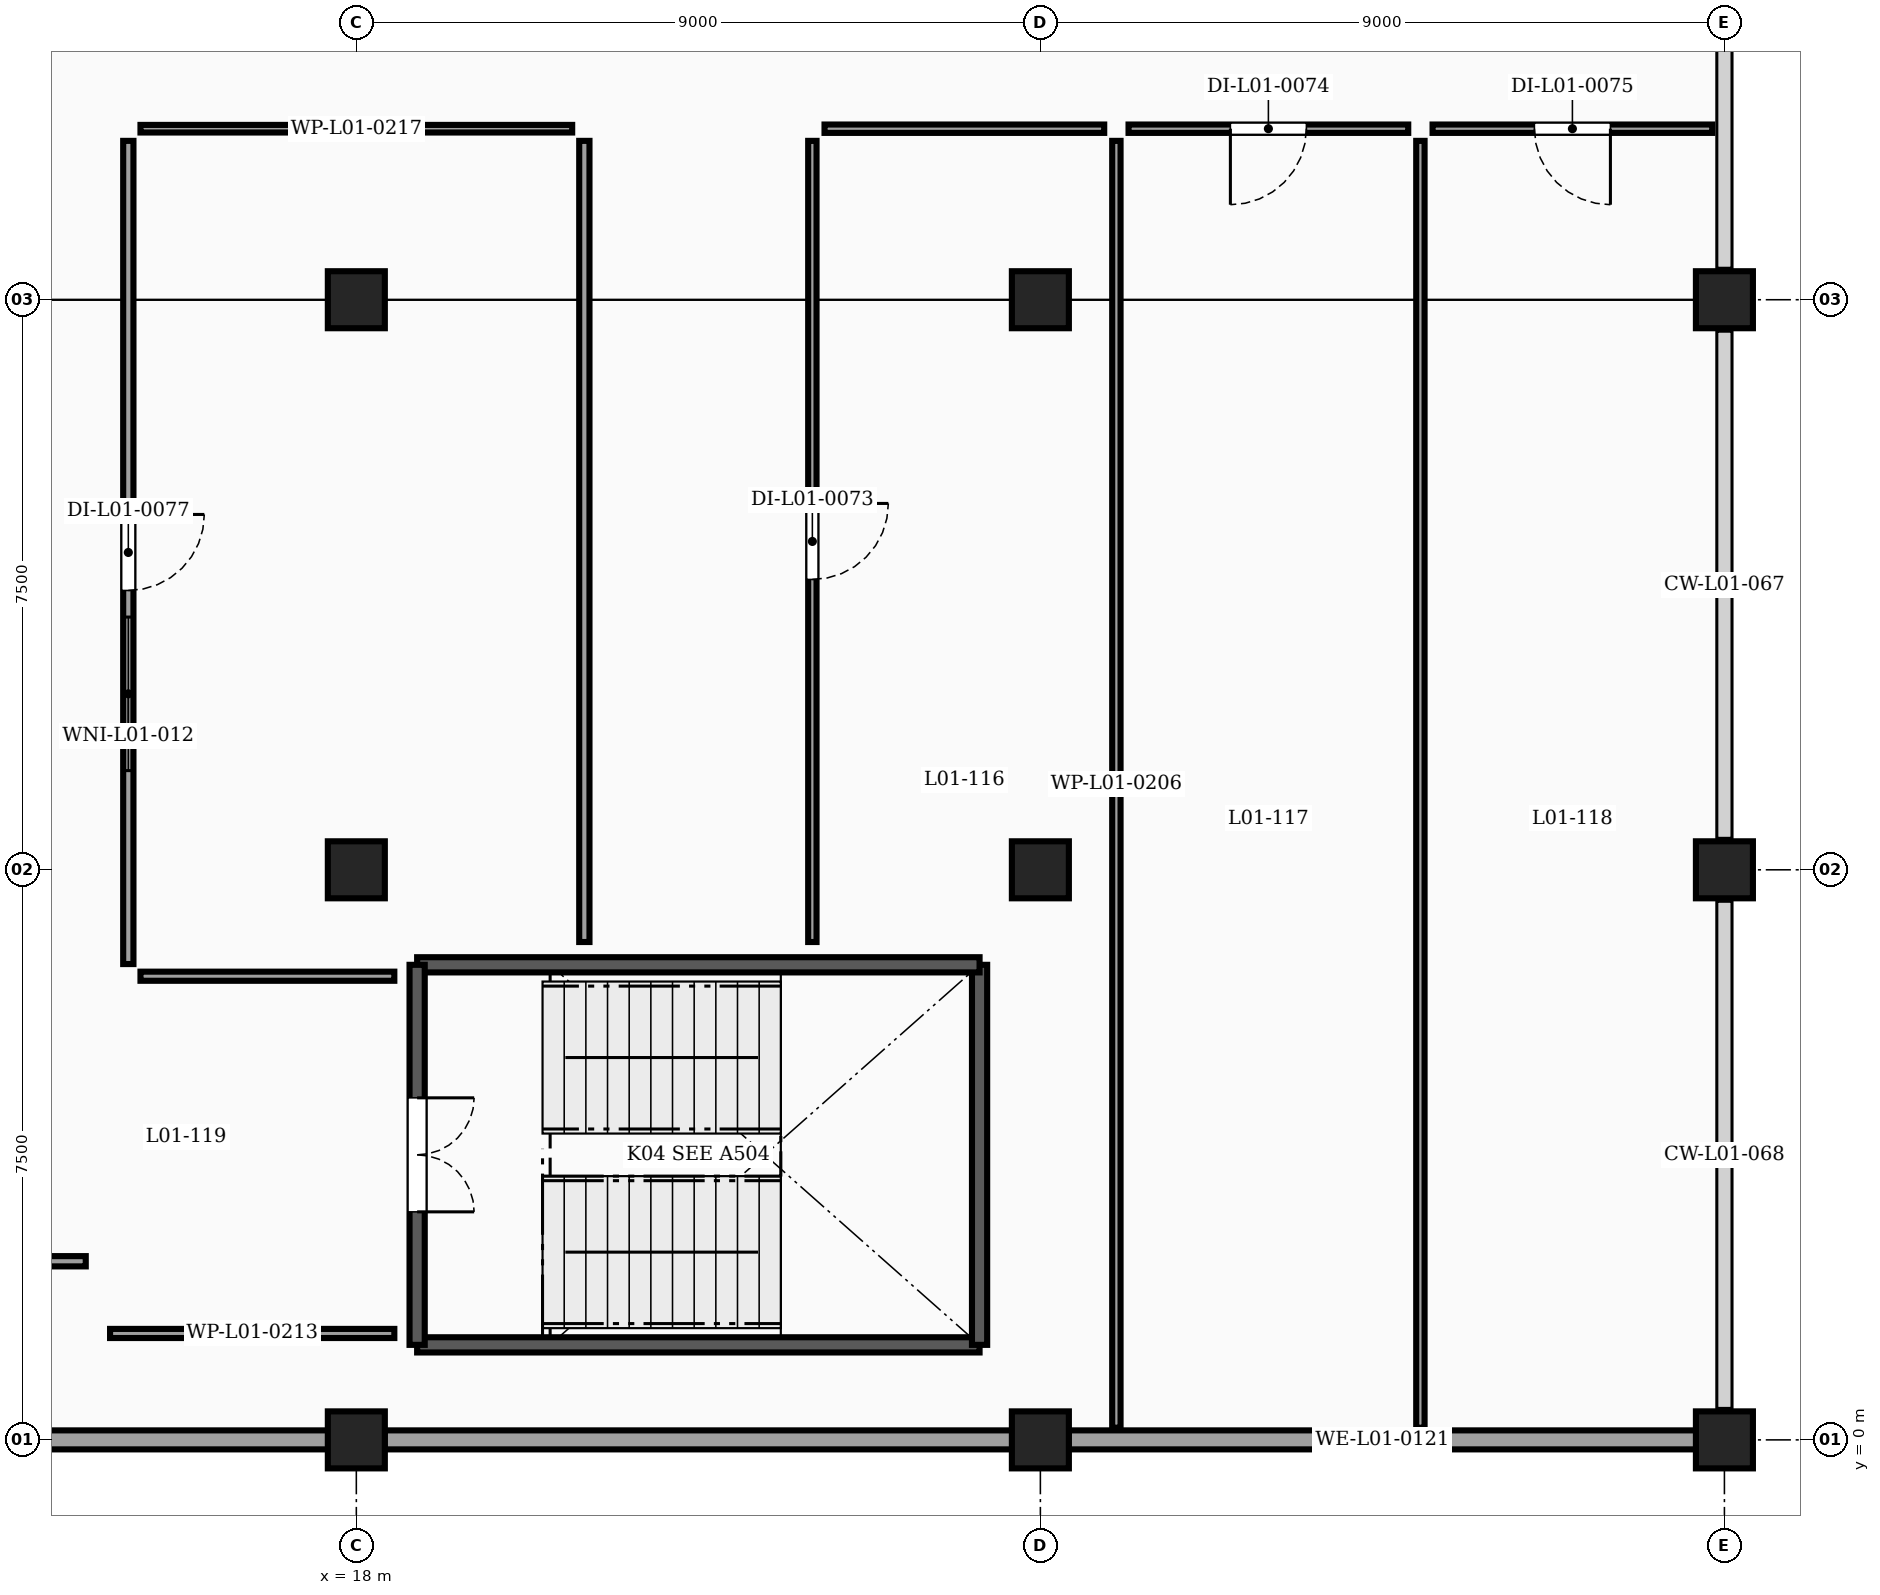
"""IFC4 building model, lengths in metres.
Left out: names, types, materials, properties, quantities, classifications, styles, units other than length and angle.
Written with IfcOpenShell. Run it as: python <this file> out.ifc"""

import sys

from ifc_helpers import new_model, si_unit, direction, frame, frame_2d, origin, origin_2d, place, context, subcontext, project, spatial, rectangle, extrude, element, fill, save


model = new_model("IFC4")
c1 = context("Model", 3, precision=1e-05, world=origin(), true_north=direction((0.0, 1.0)))
c2 = subcontext(c1, "Body", "Model", "MODEL_VIEW")
j1 = project(units=[si_unit("LENGTHUNIT", "METRE"), si_unit("PLANEANGLEUNIT", "RADIAN")], contexts=[c1])
p1 = place(None, origin())
s1 = spatial("IfcSite", under=j1, at=p1, CompositionType="ELEMENT")
p2 = place(p1, origin())
s2 = spatial("IfcBuilding", under=s1, at=p2, CompositionType="ELEMENT")
p3 = place(p2, frame((0.0, 0.0, 4.5)))
s3 = spatial("IfcBuildingStorey", under=s2, at=p3, CompositionType="ELEMENT", Elevation=4.5)
for number, where, z_axis, x_axis in (
    (1, (18.0, 0.0, 0.0), (0.0, 0.0, 1.0), (1.0, 0.0, 0.0)),
    (2, (27.0, 0.0, 0.0), (0.0, 0.0, 1.0), (1.0, 0.0, 0.0)),
    (3, (36.0, 0.0, 0.0), (0.0, 0.0, 1.0), (1.0, 0.0, 0.0)),
    (4, (18.0, 7.5, 0.0), (0.0, 0.0, 1.0), (1.0, 0.0, 0.0)),
    (5, (27.0, 7.5, 0.0), (0.0, 0.0, 1.0), (1.0, 0.0, 0.0)),
    (6, (36.0, 7.5, 0.0), (0.0, 0.0, 1.0), (1.0, 0.0, 0.0)),
    (7, (18.0, 15.0, 0.0), (0.0, 0.0, 1.0), (1.0, 0.0, 0.0)),
    (8, (27.0, 15.0, 0.0), (0.0, 0.0, 1.0), (1.0, 0.0, 0.0)),
    (9, (36.0, 15.0, 0.0), (0.0, 0.0, 1.0), (1.0, 0.0, 0.0)),
):
    element("IfcColumn", number, at=place(p3, frame(where, z_axis=z_axis, x_axis=x_axis)), inside=s3, PredefinedType="COLUMN", context=c2, shape_type="SweptSolid", body=[
        extrude(rectangle(XDim=0.75, YDim=0.75, at=origin_2d()), origin(), (0.0, 0.0, 1.0), 4.0),
    ])
for number, where, z_axis, x_axis in (
    (10, (35.629, 0.0, 0.0), (0.0, 0.0, 1.0), (-1.0, 0.0, 0.0)),
    (11, (26.629, 0.0, 0.0), (0.0, 0.0, 1.0), (-1.0, 0.0, 0.0)),
    (12, (17.629, 0.0, 0.0), (0.0, 0.0, 1.0), (-1.0, 0.0, 0.0)),
):
    element("IfcWall", number, at=place(p3, frame(where, z_axis=z_axis, x_axis=x_axis)), inside=s3, PredefinedType="SOLIDWALL", context=c2, shape_type="SweptSolid", body=[
        extrude(rectangle(XDim=8.258, YDim=0.25, at=frame_2d((4.129, 0.0))), origin(), (0.0, 0.0, 1.0), 3.41),
    ])
p4 = place(p3, frame((18.8, 1.25, 0.0), z_axis=(0.0, 0.0, 1.0), x_axis=(1.0, 0.0, 0.0)))
e13 = element("IfcWall", 13, at=p4, inside=s3, PredefinedType="SHEAR", context=c2, shape_type="SweptSolid", body=[
    extrude(rectangle(XDim=7.4, YDim=0.2, at=frame_2d((3.7, 0.0))), origin(), (0.0, 0.0, 1.0), 3.77),
])
p5 = place(p3, frame((26.2, 1.25, 0.0), z_axis=(0.0, 0.0, 1.0), x_axis=(0.0, 1.0, 0.0)))
e14 = element("IfcWall", 14, at=p5, inside=s3, PredefinedType="SHEAR", context=c2, shape_type="SweptSolid", body=[
    extrude(rectangle(XDim=5.0, YDim=0.2, at=frame_2d((2.5, 0.0))), origin(), (0.0, 0.0, 1.0), 3.77),
])
p6 = place(p3, frame((26.2, 6.25, 0.0), z_axis=(0.0, 0.0, 1.0), x_axis=(-1.0, 0.0, 0.0)))
e15 = element("IfcWall", 15, at=p6, inside=s3, PredefinedType="SHEAR", context=c2, shape_type="SweptSolid", body=[
    extrude(rectangle(XDim=7.4, YDim=0.2, at=frame_2d((3.7, 0.0))), origin(), (0.0, 0.0, 1.0), 3.77),
])
p7 = place(p3, frame((18.8, 6.25, 0.0), z_axis=(0.0, 0.0, 1.0), x_axis=(0.0, -1.0, 0.0)))
e16 = element("IfcWall", 16, at=p7, inside=s3, PredefinedType="SHEAR", context=c2, shape_type="SweptSolid", body=[
    extrude(rectangle(XDim=5.0, YDim=0.2, at=frame_2d((2.5, 0.0))), origin(), (0.0, 0.0, 1.0), 3.77),
])
p8 = place(p7, frame((1.75, 0.0, 0.0)))
e17 = element("IfcOpeningElement", 17, at=p8, cuts=e16, PredefinedType="OPENING", context=c2, shape_type="SweptSolid", body=[
    extrude(rectangle(XDim=1.5, YDim=2.15, at=frame_2d((0.75, 1.075))), frame((0.0, 0.11, 0.0), z_axis=(0.0, -1.0, 0.0), x_axis=(1.0, 0.0, 0.0)), (0.0, 0.0, 1.0), 0.22),
])
p9 = place(p3, frame((28.0, 0.16, 0.0), z_axis=(0.0, 0.0, 1.0), x_axis=(0.0, 1.0, 0.0)))
e18 = element("IfcWall", 18, at=p9, inside=s3, PredefinedType="PARTITIONING", context=c2, shape_type="SweptSolid", body=[
    extrude(rectangle(XDim=16.93, YDim=0.11, at=frame_2d((8.465, 0.0))), origin(), (0.0, 0.0, 1.0), 3.77),
])
p10 = place(p3, frame((24.0, 17.09, 0.0), z_axis=(0.0, 0.0, 1.0), x_axis=(0.0, -1.0, 0.0)))
e19 = element("IfcWall", 19, at=p10, inside=s3, PredefinedType="PARTITIONING", context=c2, shape_type="SweptSolid", body=[
    extrude(rectangle(XDim=10.54, YDim=0.11, at=frame_2d((5.27, 0.0))), origin(), (0.0, 0.0, 1.0), 3.362),
])
p11 = place(p10, frame((4.77, 0.0, 0.0)))
e20 = element("IfcOpeningElement", 20, at=p11, cuts=e19, PredefinedType="OPENING", context=c2, shape_type="SweptSolid", body=[
    extrude(rectangle(XDim=1.0, YDim=2.15, at=frame_2d((0.5, 1.075))), frame((0.0, 0.065, 0.0), z_axis=(0.0, -1.0, 0.0), x_axis=(1.0, 0.0, 0.0)), (0.0, 0.0, 1.0), 0.13),
])
p12 = place(p3, frame((27.84, 17.25, 0.0), z_axis=(0.0, 0.0, 1.0), x_axis=(-1.0, 0.0, 0.0)))
e21 = element("IfcWall", 21, at=p12, inside=s3, PredefinedType="PARTITIONING", context=c2, shape_type="SweptSolid", body=[
    extrude(rectangle(XDim=3.68, YDim=0.11, at=frame_2d((1.84, 0.0))), origin(), (0.0, 0.0, 1.0), 3.77),
])
p13 = place(p3, frame((32.0, 0.16, 0.0), z_axis=(0.0, 0.0, 1.0), x_axis=(0.0, 1.0, 0.0)))
e22 = element("IfcWall", 22, at=p13, inside=s3, PredefinedType="PARTITIONING", context=c2, shape_type="SweptSolid", body=[
    extrude(rectangle(XDim=16.93, YDim=0.11, at=frame_2d((8.465, 0.0))), origin(), (0.0, 0.0, 1.0), 3.77),
])
p14 = place(p3, frame((31.84, 17.25, 0.0), z_axis=(0.0, 0.0, 1.0), x_axis=(-1.0, 0.0, 0.0)))
e23 = element("IfcWall", 23, at=p14, inside=s3, PredefinedType="PARTITIONING", context=c2, shape_type="SweptSolid", body=[
    extrude(rectangle(XDim=3.68, YDim=0.11, at=frame_2d((1.84, 0.0))), origin(), (0.0, 0.0, 1.0), 3.77),
])
p15 = place(p14, frame((1.34, 0.0, 0.0)))
e24 = element("IfcOpeningElement", 24, at=p15, cuts=e23, PredefinedType="OPENING", context=c2, shape_type="SweptSolid", body=[
    extrude(rectangle(XDim=1.0, YDim=2.15, at=frame_2d((0.5, 1.075))), frame((0.0, 0.065, 0.0), z_axis=(0.0, -1.0, 0.0), x_axis=(1.0, 0.0, 0.0)), (0.0, 0.0, 1.0), 0.13),
])
p16 = place(p3, frame((35.84, 17.25, 0.0), z_axis=(0.0, 0.0, 1.0), x_axis=(-1.0, 0.0, 0.0)))
e25 = element("IfcWall", 25, at=p16, inside=s3, PredefinedType="PARTITIONING", context=c2, shape_type="SweptSolid", body=[
    extrude(rectangle(XDim=3.68, YDim=0.11, at=frame_2d((1.84, 0.0))), origin(), (0.0, 0.0, 1.0), 3.77),
])
p17 = place(p16, frame((1.34, 0.0, 0.0)))
e26 = element("IfcOpeningElement", 26, at=p17, cuts=e25, PredefinedType="OPENING", context=c2, shape_type="SweptSolid", body=[
    extrude(rectangle(XDim=1.0, YDim=2.15, at=frame_2d((0.5, 1.075))), frame((0.0, 0.065, 0.0), z_axis=(0.0, -1.0, 0.0), x_axis=(1.0, 0.0, 0.0)), (0.0, 0.0, 1.0), 0.13),
])
p18 = place(p3, frame((18.5, 1.4, 0.0), z_axis=(0.0, 0.0, 1.0), x_axis=(-1.0, 0.0, 0.0)))
e27 = element("IfcWall", 27, at=p18, inside=s3, PredefinedType="PARTITIONING", context=c2, shape_type="SweptSolid", body=[
    extrude(rectangle(XDim=3.74, YDim=0.12, at=frame_2d((1.87, 0.0))), origin(), (0.0, 0.0, 1.0), 3.77),
])
p19 = place(p3, frame((14.44, 2.35, 0.0), z_axis=(0.0, 0.0, 1.0), x_axis=(-1.0, 0.0, 0.0)))
e28 = element("IfcWall", 28, at=p19, inside=s3, PredefinedType="PARTITIONING", context=c2, shape_type="SweptSolid", body=[
    extrude(rectangle(XDim=2.18, YDim=0.135, at=frame_2d((1.09, 0.0))), origin(), (0.0, 0.0, 1.0), 3.77),
])
p20 = place(p3, frame((21.0, 6.55, 0.0), z_axis=(0.0, 0.0, 1.0), x_axis=(0.0, 1.0, 0.0)))
e29 = element("IfcWall", 29, at=p20, inside=s3, PredefinedType="PARTITIONING", context=c2, shape_type="SweptSolid", body=[
    extrude(rectangle(XDim=10.54, YDim=0.135, at=frame_2d((5.27, 0.0))), origin(), (0.0, 0.0, 1.0), 3.362),
])
p21 = place(p3, frame((20.84, 17.25, 0.0), z_axis=(0.0, 0.0, 1.0), x_axis=(-1.0, 0.0, 0.0)))
e30 = element("IfcWall", 30, at=p21, inside=s3, PredefinedType="PARTITIONING", context=c2, shape_type="SweptSolid", body=[
    extrude(rectangle(XDim=5.68, YDim=0.1, at=frame_2d((2.84, 0.0))), origin(), (0.0, 0.0, 1.0), 3.77),
])
p22 = place(p3, frame((15.0, 17.09, 0.0), z_axis=(0.0, 0.0, 1.0), x_axis=(0.0, -1.0, 0.0)))
e31 = element("IfcWall", 31, at=p22, inside=s3, PredefinedType="PARTITIONING", context=c2, shape_type="SweptSolid", body=[
    extrude(rectangle(XDim=10.83, YDim=0.135, at=frame_2d((5.415, 0.0))), origin(), (0.0, 0.0, 1.0), 3.362),
])
p23 = place(p22, frame((4.915, 0.0, 0.0)))
e32 = element("IfcOpeningElement", 32, at=p23, cuts=e31, PredefinedType="OPENING", context=c2, shape_type="SweptSolid", body=[
    extrude(rectangle(XDim=1.0, YDim=2.15, at=frame_2d((0.5, 1.075))), frame((0.0, 0.077, 0.0), z_axis=(0.0, -1.0, 0.0), x_axis=(1.0, 0.0, 0.0)), (0.0, 0.0, 1.0), 0.155),
])
p24 = place(p22, frame((6.265, 0.0, 1.02)))
e33 = element("IfcOpeningElement", 33, at=p24, cuts=e31, PredefinedType="OPENING", context=c2, shape_type="SweptSolid", body=[
    extrude(rectangle(XDim=2.02, YDim=1.24, at=frame_2d((1.01, 0.62))), frame((0.0, 0.077, 0.0), z_axis=(0.0, -1.0, 0.0), x_axis=(1.0, 0.0, 0.0)), (0.0, 0.0, 1.0), 0.155),
])
p25 = place(p3, frame((15.16, 6.1, 0.0), z_axis=(0.0, 0.0, 1.0), x_axis=(1.0, 0.0, 0.0)))
e34 = element("IfcWall", 34, at=p25, inside=s3, PredefinedType="PARTITIONING", context=c2, shape_type="SweptSolid", body=[
    extrude(rectangle(XDim=3.34, YDim=0.12, at=frame_2d((1.67, 0.0))), origin(), (0.0, 0.0, 1.0), 3.77),
])
p26 = place(p8, origin())
e35 = element("IfcDoor", 35, at=p26, inside=s3, OperationType="DOUBLE_DOOR_SINGLE_SWING", PredefinedType="DOOR", context=c2, shape_type="SweptSolid", body=[
    extrude(rectangle(XDim=1.5, YDim=2.15, at=frame_2d((0.75, 1.075))), frame((0.0, 0.025, 0.0), z_axis=(0.0, -1.0, 0.0), x_axis=(1.0, 0.0, 0.0)), (0.0, 0.0, 1.0), 0.05),
])
fill(e17, e35)
p27 = place(p11, origin())
e36 = element("IfcDoor", 36, at=p27, inside=s3, OperationType="SINGLE_SWING_LEFT", PredefinedType="DOOR", context=c2, shape_type="SweptSolid", body=[
    extrude(rectangle(XDim=1.0, YDim=2.15, at=frame_2d((0.5, 1.075))), frame((0.0, 0.025, 0.0), z_axis=(0.0, -1.0, 0.0), x_axis=(1.0, 0.0, 0.0)), (0.0, 0.0, 1.0), 0.05),
])
fill(e20, e36)
p28 = place(p15, origin())
e37 = element("IfcDoor", 37, at=p28, inside=s3, OperationType="SINGLE_SWING_RIGHT", PredefinedType="DOOR", context=c2, shape_type="SweptSolid", body=[
    extrude(rectangle(XDim=1.0, YDim=2.15, at=frame_2d((0.5, 1.075))), frame((0.0, 0.025, 0.0), z_axis=(0.0, -1.0, 0.0), x_axis=(1.0, 0.0, 0.0)), (0.0, 0.0, 1.0), 0.05),
])
fill(e24, e37)
p29 = place(p17, origin())
e38 = element("IfcDoor", 38, at=p29, inside=s3, OperationType="SINGLE_SWING_LEFT", PredefinedType="DOOR", context=c2, shape_type="SweptSolid", body=[
    extrude(rectangle(XDim=1.0, YDim=2.15, at=frame_2d((0.5, 1.075))), frame((0.0, 0.025, 0.0), z_axis=(0.0, -1.0, 0.0), x_axis=(1.0, 0.0, 0.0)), (0.0, 0.0, 1.0), 0.05),
])
fill(e26, e38)
p30 = place(p23, origin())
e39 = element("IfcDoor", 39, at=p30, inside=s3, OperationType="SINGLE_SWING_LEFT", PredefinedType="DOOR", context=c2, shape_type="SweptSolid", body=[
    extrude(rectangle(XDim=1.0, YDim=2.15, at=frame_2d((0.5, 1.075))), frame((0.0, 0.025, 0.0), z_axis=(0.0, -1.0, 0.0), x_axis=(1.0, 0.0, 0.0)), (0.0, 0.0, 1.0), 0.05),
])
fill(e32, e39)
p31 = place(p24, origin())
e40 = element("IfcWindow", 40, at=p31, inside=s3, PartitioningType="DOUBLE_PANEL_VERTICAL", PredefinedType="WINDOW", context=c2, shape_type="SweptSolid", body=[
    extrude(rectangle(XDim=2.02, YDim=1.24, at=frame_2d((1.01, 0.62))), frame((0.0, 0.03, 0.0), z_axis=(0.0, -1.0, 0.0), x_axis=(1.0, 0.0, 0.0)), (0.0, 0.0, 1.0), 0.06),
])
fill(e33, e40)
save(model, sys.argv[1])
